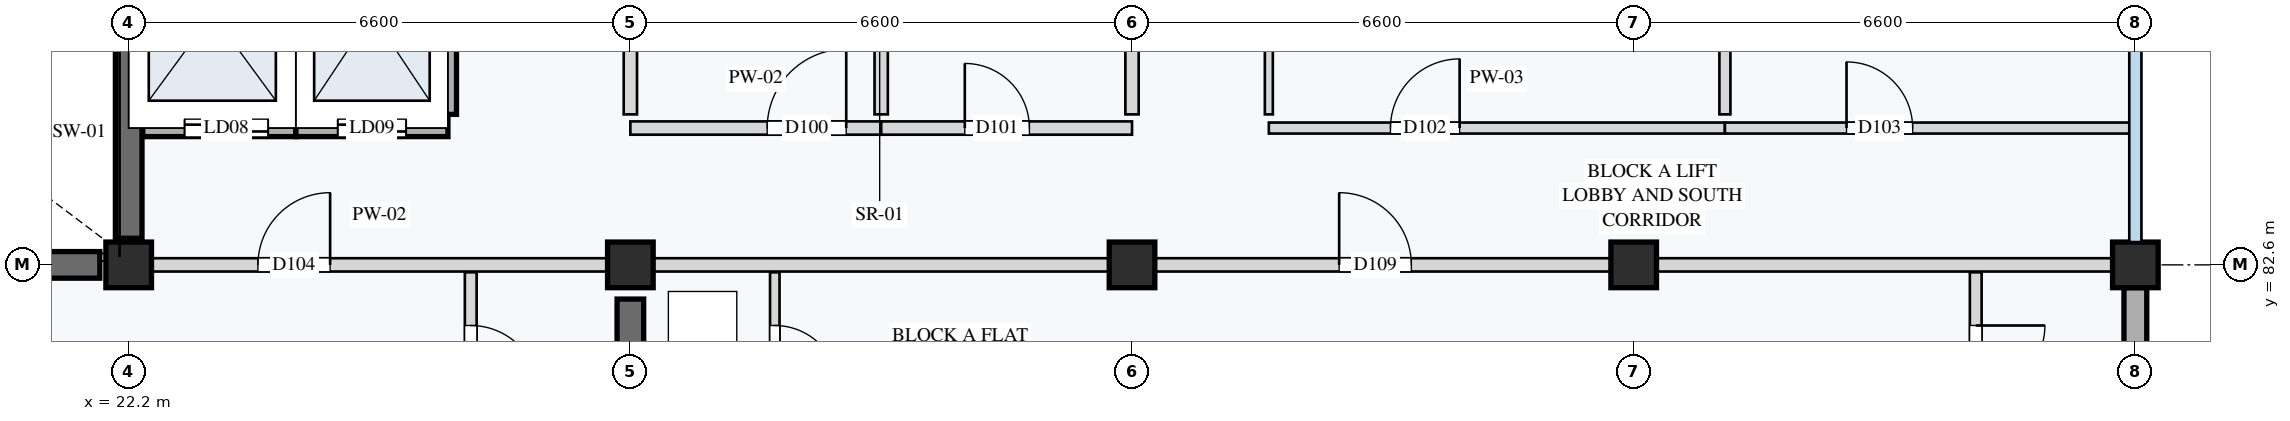
"""IFC4 building model, lengths in metres.
Left out: names, types, materials, properties, quantities, classifications, styles, units other than length and angle.
Written with IfcOpenShell. Run it as: python <this file> out.ifc"""

import sys

from ifc_helpers import new_model, si_unit, direction, frame, frame_2d, origin, origin_2d, place, context, subcontext, project, spatial, rectangle, extrude, element, fill, save


model = new_model("IFC4")
c1 = context("Model", 3, precision=1e-05, world=origin(), true_north=direction((0.0, 1.0)))
c2 = subcontext(c1, "Body", "Model", "MODEL_VIEW")
j1 = project(units=[si_unit("LENGTHUNIT", "METRE"), si_unit("PLANEANGLEUNIT", "RADIAN")], contexts=[c1])
p1 = place(None, origin())
s1 = spatial("IfcSite", under=j1, at=p1, CompositionType="ELEMENT")
p2 = place(p1, origin())
s2 = spatial("IfcBuilding", under=s1, at=p2, CompositionType="ELEMENT")
p3 = place(p2, frame((0.0, 0.0, 11.6)))
s3 = spatial("IfcBuildingStorey", under=s2, at=p3, CompositionType="ELEMENT", Elevation=11.6)
for number, where, z_axis, x_axis in (
    (1, (22.2, 82.6, 0.0), (0.0, 0.0, 1.0), (1.0, 0.0, 0.0)),
    (2, (28.8, 82.6, 0.0), (0.0, 0.0, 1.0), (1.0, 0.0, 0.0)),
    (3, (35.4, 82.6, 0.0), (0.0, 0.0, 1.0), (1.0, 0.0, 0.0)),
    (4, (42.0, 82.6, 0.0), (0.0, 0.0, 1.0), (1.0, 0.0, 0.0)),
    (5, (48.6, 82.6, 0.0), (0.0, 0.0, 1.0), (1.0, 0.0, 0.0)),
):
    element("IfcColumn", number, at=place(p3, frame(where, z_axis=z_axis, x_axis=x_axis)), inside=s3, PredefinedType="COLUMN", context=c2, shape_type="SweptSolid", body=[
        extrude(rectangle(XDim=0.6, YDim=0.6, at=origin_2d()), origin(), (0.0, 0.0, 1.0), 3.2),
    ])
p4 = place(p3, frame((15.98, 82.6, 0.0), z_axis=(0.0, 0.0, 1.0), x_axis=(1.0, 0.0, 0.0)))
e6 = element("IfcWall", 6, at=p4, inside=s3, PredefinedType="SHEAR", context=c2, shape_type="SweptSolid", body=[
    extrude(rectangle(XDim=5.84, YDim=0.35, at=frame_2d((2.92, 0.0))), origin(), (0.0, 0.0, 1.0), 2.96),
])
p5 = place(p3, frame((22.2, 82.95, 0.0), z_axis=(0.0, 0.0, 1.0), x_axis=(0.0, 1.0, 0.0)))
e7 = element("IfcWall", 7, at=p5, inside=s3, PredefinedType="SHEAR", context=c2, shape_type="SweptSolid", body=[
    extrude(rectangle(XDim=2.8, YDim=0.35, at=frame_2d((1.4, 0.0))), origin(), (0.0, 0.0, 1.0), 2.96),
])
p6 = place(p3, frame((28.8, 76.45, 0.0), z_axis=(0.0, 0.0, 1.0), x_axis=(0.0, 1.0, 0.0)))
e8 = element("IfcWall", 8, at=p6, inside=s3, PredefinedType="SHEAR", context=c2, shape_type="SweptSolid", body=[
    extrude(rectangle(XDim=5.7, YDim=0.35, at=frame_2d((2.85, 0.0))), origin(), (0.0, 0.0, 1.0), 2.96),
])
p7 = place(p3, frame((48.6, 76.375, 0.0), z_axis=(0.0, 0.0, 1.0), x_axis=(0.0, 1.0, 0.0)))
e9 = element("IfcWall", 9, at=p7, inside=s3, PredefinedType="STANDARD", context=c2, shape_type="SweptSolid", body=[
    extrude(rectangle(XDim=5.925, YDim=0.3, at=frame_2d((2.962, 0.0))), origin(), (0.0, 0.0, 1.0), 2.65),
])
p8 = place(p3, frame((22.385, 84.4, 0.0), z_axis=(0.0, 0.0, 1.0), x_axis=(1.0, 0.0, 0.0)))
e10 = element("IfcWall", 10, at=p8, inside=s3, PredefinedType="STANDARD", context=c2, shape_type="SweptSolid", body=[
    extrude(rectangle(XDim=2.015, YDim=0.225, at=frame_2d((1.007, 0.0))), origin(), (0.0, 0.0, 1.0), 2.96),
])
p9 = place(p8, frame((0.55, 0.0, 0.0)))
e11 = element("IfcOpeningElement", 11, at=p9, cuts=e10, PredefinedType="OPENING", context=c2, shape_type="SweptSolid", body=[
    extrude(rectangle(XDim=1.1, YDim=2.1, at=frame_2d((0.55, 1.05))), frame((0.0, 0.123, 0.0), z_axis=(0.0, -1.0, 0.0), x_axis=(1.0, 0.0, 0.0)), (0.0, 0.0, 1.0), 0.245),
])
p10 = place(p3, frame((24.4, 84.4, 0.0), z_axis=(0.0, 0.0, 1.0), x_axis=(1.0, 0.0, 0.0)))
e12 = element("IfcWall", 12, at=p10, inside=s3, PredefinedType="STANDARD", context=c2, shape_type="SweptSolid", body=[
    extrude(rectangle(XDim=2.0, YDim=0.225, at=frame_2d((1.0, 0.0))), origin(), (0.0, 0.0, 1.0), 2.96),
])
p11 = place(p10, frame((0.55, 0.0, 0.0)))
e13 = element("IfcOpeningElement", 13, at=p11, cuts=e12, PredefinedType="OPENING", context=c2, shape_type="SweptSolid", body=[
    extrude(rectangle(XDim=0.9, YDim=2.1, at=frame_2d((0.45, 1.05))), frame((0.0, 0.123, 0.0), z_axis=(0.0, -1.0, 0.0), x_axis=(1.0, 0.0, 0.0)), (0.0, 0.0, 1.0), 0.245),
])
for number, where, z_axis, x_axis in (
    (14, (24.4, 84.58, 0.0), (0.0, 0.0, 1.0), (0.0, 1.0, 0.0)),
    (15, (26.4, 84.58, 0.0), (0.0, 0.0, 1.0), (0.0, 1.0, 0.0)),
):
    element("IfcWall", number, at=place(p3, frame(where, z_axis=z_axis, x_axis=x_axis)), inside=s3, PredefinedType="STANDARD", context=c2, shape_type="SweptSolid", body=[
        extrude(rectangle(XDim=2.64, YDim=0.225, at=frame_2d((1.32, 0.0))), origin(), (0.0, 0.0, 1.0), 2.96),
    ])
p12 = place(p3, frame((28.8, 84.4, 0.0), z_axis=(0.0, 0.0, 1.0), x_axis=(1.0, 0.0, 0.0)))
e16 = element("IfcWall", 16, at=p12, inside=s3, PredefinedType="PARTITIONING", context=c2, shape_type="SweptSolid", body=[
    extrude(rectangle(XDim=3.3, YDim=0.175, at=frame_2d((1.65, 0.0))), origin(), (0.0, 0.0, 1.0), 2.96),
])
p13 = place(p12, frame((1.8, 0.0, 0.0)))
e17 = element("IfcOpeningElement", 17, at=p13, cuts=e16, PredefinedType="OPENING", context=c2, shape_type="SweptSolid", body=[
    extrude(rectangle(XDim=1.04, YDim=2.12, at=frame_2d((0.52, 1.06))), frame((0.0, 0.097, 0.0), z_axis=(0.0, -1.0, 0.0), x_axis=(1.0, 0.0, 0.0)), (0.0, 0.0, 1.0), 0.195),
])
p14 = place(p3, frame((32.1, 84.4, 0.0), z_axis=(0.0, 0.0, 1.0), x_axis=(1.0, 0.0, 0.0)))
e18 = element("IfcWall", 18, at=p14, inside=s3, PredefinedType="PARTITIONING", context=c2, shape_type="SweptSolid", body=[
    extrude(rectangle(XDim=3.3, YDim=0.175, at=frame_2d((1.65, 0.0))), origin(), (0.0, 0.0, 1.0), 2.96),
])
p15 = place(p14, frame((1.1, 0.0, 0.0)))
e19 = element("IfcOpeningElement", 19, at=p15, cuts=e18, PredefinedType="OPENING", context=c2, shape_type="SweptSolid", body=[
    extrude(rectangle(XDim=0.85, YDim=2.0, at=frame_2d((0.425, 1.0))), frame((0.0, 0.097, 0.0), z_axis=(0.0, -1.0, 0.0), x_axis=(1.0, 0.0, 0.0)), (0.0, 0.0, 1.0), 0.195),
])
for number, where, z_axis, x_axis in (
    (20, (28.8, 84.58, 0.0), (0.0, 0.0, 1.0), (0.0, 1.0, 0.0)),
    (21, (32.1, 84.58, 0.0), (0.0, 0.0, 1.0), (0.0, 1.0, 0.0)),
    (22, (35.4, 84.58, 0.0), (0.0, 0.0, 1.0), (0.0, 1.0, 0.0)),
):
    element("IfcWall", number, at=place(p3, frame(where, z_axis=z_axis, x_axis=x_axis)), inside=s3, PredefinedType="PARTITIONING", context=c2, shape_type="SweptSolid", body=[
        extrude(rectangle(XDim=1.14, YDim=0.175, at=frame_2d((0.57, 0.0))), origin(), (0.0, 0.0, 1.0), 2.96),
    ])
p16 = place(p3, frame((37.2, 84.4, 0.0), z_axis=(0.0, 0.0, 1.0), x_axis=(1.0, 0.0, 0.0)))
e23 = element("IfcWall", 23, at=p16, inside=s3, PredefinedType="PARTITIONING", context=c2, shape_type="SweptSolid", body=[
    extrude(rectangle(XDim=6.0, YDim=0.145, at=frame_2d((3.0, 0.0))), origin(), (0.0, 0.0, 1.0), 2.96),
])
p17 = place(p16, frame((1.6, 0.0, 0.0)))
e24 = element("IfcOpeningElement", 24, at=p17, cuts=e23, PredefinedType="OPENING", context=c2, shape_type="SweptSolid", body=[
    extrude(rectangle(XDim=0.91, YDim=2.14, at=frame_2d((0.455, 1.07))), frame((0.0, 0.083, 0.0), z_axis=(0.0, -1.0, 0.0), x_axis=(1.0, 0.0, 0.0)), (0.0, 0.0, 1.0), 0.165),
])
p18 = place(p3, frame((43.2, 84.4, 0.0), z_axis=(0.0, 0.0, 1.0), x_axis=(1.0, 0.0, 0.0)))
e25 = element("IfcWall", 25, at=p18, inside=s3, PredefinedType="PARTITIONING", context=c2, shape_type="SweptSolid", body=[
    extrude(rectangle(XDim=5.4, YDim=0.145, at=frame_2d((2.7, 0.0))), origin(), (0.0, 0.0, 1.0), 2.96),
])
p19 = place(p18, frame((1.6, 0.0, 0.0)))
e26 = element("IfcOpeningElement", 26, at=p19, cuts=e25, PredefinedType="OPENING", context=c2, shape_type="SweptSolid", body=[
    extrude(rectangle(XDim=0.87, YDim=2.08, at=frame_2d((0.435, 1.04))), frame((0.0, 0.083, 0.0), z_axis=(0.0, -1.0, 0.0), x_axis=(1.0, 0.0, 0.0)), (0.0, 0.0, 1.0), 0.165),
])
p20 = place(p3, frame((43.2, 84.58, 0.0), z_axis=(0.0, 0.0, 1.0), x_axis=(0.0, 1.0, 0.0)))
e27 = element("IfcWall", 27, at=p20, inside=s3, PredefinedType="PARTITIONING", context=c2, shape_type="SweptSolid", body=[
    extrude(rectangle(XDim=2.64, YDim=0.145, at=frame_2d((1.32, 0.0))), origin(), (0.0, 0.0, 1.0), 2.96),
])
p21 = place(p3, frame((37.2, 84.58, 0.0), z_axis=(0.0, 0.0, 1.0), x_axis=(0.0, 1.0, 0.0)))
e28 = element("IfcWall", 28, at=p21, inside=s3, PredefinedType="PARTITIONING", context=c2, shape_type="SweptSolid", body=[
    extrude(rectangle(XDim=2.64, YDim=0.105, at=frame_2d((1.32, 0.0))), origin(), (0.0, 0.0, 1.0), 2.96),
])
p22 = place(p3, frame((22.2, 82.6, 0.0), z_axis=(0.0, 0.0, 1.0), x_axis=(1.0, 0.0, 0.0)))
e29 = element("IfcWall", 29, at=p22, inside=s3, PredefinedType="PARTITIONING", context=c2, shape_type="SweptSolid", body=[
    extrude(rectangle(XDim=6.6, YDim=0.175, at=frame_2d((3.3, 0.0))), origin(), (0.0, 0.0, 1.0), 2.55),
])
p23 = place(p22, frame((1.7, 0.0, 0.0)))
e30 = element("IfcOpeningElement", 30, at=p23, cuts=e29, PredefinedType="OPENING", context=c2, shape_type="SweptSolid", body=[
    extrude(rectangle(XDim=0.95, YDim=2.1, at=frame_2d((0.475, 1.05))), frame((0.0, 0.097, 0.0), z_axis=(0.0, -1.0, 0.0), x_axis=(1.0, 0.0, 0.0)), (0.0, 0.0, 1.0), 0.195),
])
p24 = place(p3, frame((26.7, 82.502, 0.0), z_axis=(0.0, 0.0, 1.0), x_axis=(0.0, -1.0, 0.0)))
e31 = element("IfcWall", 31, at=p24, inside=s3, PredefinedType="PARTITIONING", context=c2, shape_type="SweptSolid", body=[
    extrude(rectangle(XDim=2.302, YDim=0.155, at=frame_2d((1.151, 0.0))), origin(), (0.0, 0.0, 1.0), 2.96),
])
p25 = place(p24, frame((0.7, 0.0, 0.0)))
e32 = element("IfcOpeningElement", 32, at=p25, cuts=e31, PredefinedType="OPENING", context=c2, shape_type="SweptSolid", body=[
    extrude(rectangle(XDim=0.9, YDim=2.16, at=frame_2d((0.45, 1.08))), frame((0.0, 0.087, 0.0), z_axis=(0.0, -1.0, 0.0), x_axis=(1.0, 0.0, 0.0)), (0.0, 0.0, 1.0), 0.175),
])
p26 = place(p3, frame((28.8, 82.6, 0.0), z_axis=(0.0, 0.0, 1.0), x_axis=(1.0, 0.0, 0.0)))
e33 = element("IfcWall", 33, at=p26, inside=s3, PredefinedType="PARTITIONING", context=c2, shape_type="SweptSolid", body=[
    extrude(rectangle(XDim=19.8, YDim=0.175, at=frame_2d((9.9, 0.0))), origin(), (0.0, 0.0, 1.0), 2.55),
])
p27 = place(p26, frame((9.325, 0.0, 0.0)))
e34 = element("IfcOpeningElement", 34, at=p27, cuts=e33, PredefinedType="OPENING", context=c2, shape_type="SweptSolid", body=[
    extrude(rectangle(XDim=0.95, YDim=2.16, at=frame_2d((0.475, 1.08))), frame((0.0, 0.097, 0.0), z_axis=(0.0, -1.0, 0.0), x_axis=(1.0, 0.0, 0.0)), (0.0, 0.0, 1.0), 0.195),
])
p28 = place(p3, frame((30.7, 82.502, 0.0), z_axis=(0.0, 0.0, 1.0), x_axis=(0.0, -1.0, 0.0)))
e35 = element("IfcWall", 35, at=p28, inside=s3, PredefinedType="PARTITIONING", context=c2, shape_type="SweptSolid", body=[
    extrude(rectangle(XDim=2.302, YDim=0.125, at=frame_2d((1.151, 0.0))), origin(), (0.0, 0.0, 1.0), 2.96),
])
p29 = place(p28, frame((0.7, 0.0, 0.0)))
e36 = element("IfcOpeningElement", 36, at=p29, cuts=e35, PredefinedType="OPENING", context=c2, shape_type="SweptSolid", body=[
    extrude(rectangle(XDim=0.84, YDim=2.06, at=frame_2d((0.42, 1.03))), frame((0.0, 0.073, 0.0), z_axis=(0.0, -1.0, 0.0), x_axis=(1.0, 0.0, 0.0)), (0.0, 0.0, 1.0), 0.145),
])
p30 = place(p3, frame((46.5, 82.502, 0.0), z_axis=(0.0, 0.0, 1.0), x_axis=(0.0, -1.0, 0.0)))
e37 = element("IfcWall", 37, at=p30, inside=s3, PredefinedType="PARTITIONING", context=c2, shape_type="SweptSolid", body=[
    extrude(rectangle(XDim=2.302, YDim=0.155, at=frame_2d((1.151, 0.0))), origin(), (0.0, 0.0, 1.0), 2.96),
])
p31 = place(p30, frame((0.7, 0.0, 0.0)))
e38 = element("IfcOpeningElement", 38, at=p31, cuts=e37, PredefinedType="OPENING", context=c2, shape_type="SweptSolid", body=[
    extrude(rectangle(XDim=0.91, YDim=2.14, at=frame_2d((0.455, 1.07))), frame((0.0, 0.087, 0.0), z_axis=(0.0, -1.0, 0.0), x_axis=(1.0, 0.0, 0.0)), (0.0, 0.0, 1.0), 0.175),
])
p32 = place(p9, origin())
e39 = element("IfcDoor", 39, at=p32, inside=s3, OperationType="DOUBLE_DOOR_SLIDING", PredefinedType="DOOR", context=c2, shape_type="SweptSolid", body=[
    extrude(rectangle(XDim=1.1, YDim=2.1, at=frame_2d((0.55, 1.05))), frame((0.0, 0.025, 0.0), z_axis=(0.0, -1.0, 0.0), x_axis=(1.0, 0.0, 0.0)), (0.0, 0.0, 1.0), 0.05),
])
fill(e11, e39)
p33 = place(p11, origin())
e40 = element("IfcDoor", 40, at=p33, inside=s3, OperationType="DOUBLE_DOOR_SLIDING", PredefinedType="DOOR", context=c2, shape_type="SweptSolid", body=[
    extrude(rectangle(XDim=0.9, YDim=2.1, at=frame_2d((0.45, 1.05))), frame((0.0, 0.025, 0.0), z_axis=(0.0, -1.0, 0.0), x_axis=(1.0, 0.0, 0.0)), (0.0, 0.0, 1.0), 0.05),
])
fill(e13, e40)
p34 = place(p13, origin())
e41 = element("IfcDoor", 41, at=p34, inside=s3, OperationType="SINGLE_SWING_RIGHT", PredefinedType="DOOR", context=c2, shape_type="SweptSolid", body=[
    extrude(rectangle(XDim=1.04, YDim=2.12, at=frame_2d((0.52, 1.06))), frame((0.0, 0.025, 0.0), z_axis=(0.0, -1.0, 0.0), x_axis=(1.0, 0.0, 0.0)), (0.0, 0.0, 1.0), 0.05),
])
fill(e17, e41)
p35 = place(p15, origin())
e42 = element("IfcDoor", 42, at=p35, inside=s3, OperationType="SINGLE_SWING_LEFT", PredefinedType="DOOR", context=c2, shape_type="SweptSolid", body=[
    extrude(rectangle(XDim=0.85, YDim=2.0, at=frame_2d((0.425, 1.0))), frame((0.0, 0.025, 0.0), z_axis=(0.0, -1.0, 0.0), x_axis=(1.0, 0.0, 0.0)), (0.0, 0.0, 1.0), 0.05),
])
fill(e19, e42)
p36 = place(p17, origin())
e43 = element("IfcDoor", 43, at=p36, inside=s3, OperationType="SINGLE_SWING_RIGHT", PredefinedType="DOOR", context=c2, shape_type="SweptSolid", body=[
    extrude(rectangle(XDim=0.91, YDim=2.14, at=frame_2d((0.455, 1.07))), frame((0.0, 0.025, 0.0), z_axis=(0.0, -1.0, 0.0), x_axis=(1.0, 0.0, 0.0)), (0.0, 0.0, 1.0), 0.05),
])
fill(e24, e43)
p37 = place(p19, origin())
e44 = element("IfcDoor", 44, at=p37, inside=s3, OperationType="SINGLE_SWING_LEFT", PredefinedType="DOOR", context=c2, shape_type="SweptSolid", body=[
    extrude(rectangle(XDim=0.87, YDim=2.08, at=frame_2d((0.435, 1.04))), frame((0.0, 0.025, 0.0), z_axis=(0.0, -1.0, 0.0), x_axis=(1.0, 0.0, 0.0)), (0.0, 0.0, 1.0), 0.05),
])
fill(e26, e44)
p38 = place(p23, origin())
e45 = element("IfcDoor", 45, at=p38, inside=s3, OperationType="SINGLE_SWING_RIGHT", PredefinedType="DOOR", context=c2, shape_type="SweptSolid", body=[
    extrude(rectangle(XDim=0.95, YDim=2.1, at=frame_2d((0.475, 1.05))), frame((0.0, 0.025, 0.0), z_axis=(0.0, -1.0, 0.0), x_axis=(1.0, 0.0, 0.0)), (0.0, 0.0, 1.0), 0.05),
])
fill(e30, e45)
p39 = place(p25, origin())
e46 = element("IfcDoor", 46, at=p39, inside=s3, OperationType="SINGLE_SWING_RIGHT", PredefinedType="DOOR", context=c2, shape_type="SweptSolid", body=[
    extrude(rectangle(XDim=0.9, YDim=2.16, at=frame_2d((0.45, 1.08))), frame((0.0, 0.025, 0.0), z_axis=(0.0, -1.0, 0.0), x_axis=(1.0, 0.0, 0.0)), (0.0, 0.0, 1.0), 0.05),
])
fill(e32, e46)
p40 = place(p27, origin())
e47 = element("IfcDoor", 47, at=p40, inside=s3, OperationType="SINGLE_SWING_LEFT", PredefinedType="DOOR", context=c2, shape_type="SweptSolid", body=[
    extrude(rectangle(XDim=0.95, YDim=2.16, at=frame_2d((0.475, 1.08))), frame((0.0, 0.025, 0.0), z_axis=(0.0, -1.0, 0.0), x_axis=(1.0, 0.0, 0.0)), (0.0, 0.0, 1.0), 0.05),
])
fill(e34, e47)
p41 = place(p29, origin())
e48 = element("IfcDoor", 48, at=p41, inside=s3, OperationType="SINGLE_SWING_RIGHT", PredefinedType="DOOR", context=c2, shape_type="SweptSolid", body=[
    extrude(rectangle(XDim=0.84, YDim=2.06, at=frame_2d((0.42, 1.03))), frame((0.0, 0.025, 0.0), z_axis=(0.0, -1.0, 0.0), x_axis=(1.0, 0.0, 0.0)), (0.0, 0.0, 1.0), 0.05),
])
fill(e36, e48)
p42 = place(p31, origin())
e49 = element("IfcDoor", 49, at=p42, inside=s3, OperationType="SINGLE_SWING_LEFT", PredefinedType="DOOR", context=c2, shape_type="SweptSolid", body=[
    extrude(rectangle(XDim=0.91, YDim=2.14, at=frame_2d((0.455, 1.07))), frame((0.0, 0.025, 0.0), z_axis=(0.0, -1.0, 0.0), x_axis=(1.0, 0.0, 0.0)), (0.0, 0.0, 1.0), 0.05),
])
fill(e38, e49)
save(model, sys.argv[1])
